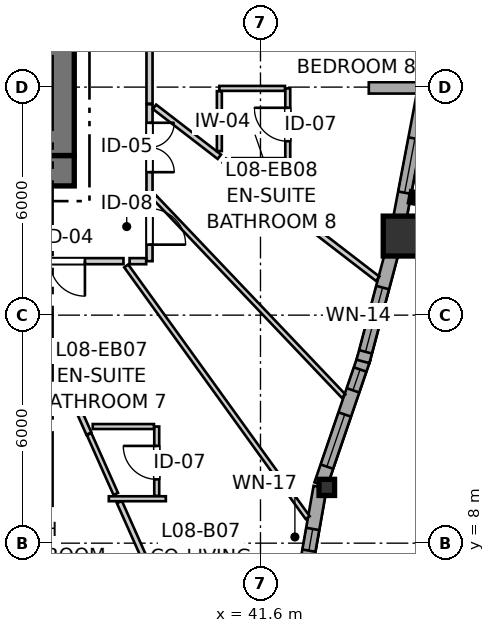
"""IFC4 building model, lengths in metres.
Left out: names, types, materials, properties, quantities, classifications, styles, units other than length and angle.
Written with IfcOpenShell. Run it as: python <this file> out.ifc"""

import sys

from ifc_helpers import new_model, si_unit, direction, frame, frame_2d, origin, origin_2d, place, context, subcontext, project, spatial, rectangle, i_section, extrude, source, transform, mapped, element, fill, save


model = new_model("IFC4")
c1 = context("Model", 3, precision=1e-05, world=origin(), true_north=direction((0.0, 1.0)))
c2 = subcontext(c1, "Body", "Model", "MODEL_VIEW")
j1 = project(units=[si_unit("LENGTHUNIT", "METRE"), si_unit("PLANEANGLEUNIT", "RADIAN")], contexts=[c1])
p1 = place(None, origin())
s1 = spatial("IfcSite", under=j1, at=p1, CompositionType="ELEMENT")
p2 = place(p1, origin())
s2 = spatial("IfcBuilding", under=s1, at=p2, CompositionType="ELEMENT")
p3 = place(p2, frame((0.0, 0.0, 30.2)))
s3 = spatial("IfcBuildingStorey", under=s2, at=p3, CompositionType="ELEMENT", Elevation=30.2)
p4 = place(p3, frame((24.0, 17.8, 0.0), z_axis=(0.0, 0.0, 1.0), x_axis=(1.0, 0.0, 0.0)))
e1 = element("IfcWall", 1, at=p4, inside=s3, PredefinedType="SHEAR", context=c2, shape_type="SweptSolid", body=[
    extrude(rectangle(XDim=12.7, YDim=0.8, at=frame_2d((6.35, 0.0))), origin(), (0.0, 0.0, 1.0), 2.935),
])
p5 = place(p3, frame((36.3, 18.2, 0.0), z_axis=(0.0, 0.0, 1.0), x_axis=(0.0, 1.0, 0.0)))
e2 = element("IfcWall", 2, at=p5, inside=s3, PredefinedType="SHEAR", context=c2, shape_type="SweptSolid", body=[
    extrude(rectangle(XDim=15.6, YDim=0.8, at=frame_2d((7.8, 0.0))), origin(), (0.0, 0.0, 1.0), 2.935),
])
p6 = place(p5, frame((4.25, 0.0, 0.0)))
e3 = element("IfcOpeningElement", 3, at=p6, cuts=e2, PredefinedType="OPENING", context=c2, shape_type="SweptSolid", body=[
    extrude(rectangle(XDim=1.1, YDim=2.15, at=frame_2d((0.55, 1.075))), frame((0.0, 0.41, 0.0), z_axis=(0.0, -1.0, 0.0), x_axis=(1.0, 0.0, 0.0)), (0.0, 0.0, 1.0), 0.82),
])
p7 = place(p5, frame((10.25, 0.0, 0.0)))
e4 = element("IfcOpeningElement", 4, at=p7, cuts=e2, PredefinedType="OPENING", context=c2, shape_type="SweptSolid", body=[
    extrude(rectangle(XDim=1.1, YDim=2.15, at=frame_2d((0.55, 1.075))), frame((0.0, 0.41, 0.0), z_axis=(0.0, -1.0, 0.0), x_axis=(1.0, 0.0, 0.0)), (0.0, 0.0, 1.0), 0.82),
])
m1 = source(origin(), c2, "Body", "SweptSolid", [
    extrude(i_section(OverallWidth=0.409, OverallDepth=0.425, WebThickness=0.03, FlangeThickness=0.048, FilletRadius=0.015, at=origin_2d()), origin(), (0.0, 0.0, 1.0), 2.935),
])
p8 = place(p3, frame((43.345, 9.468, 0.0), z_axis=(0.0, 0.0, 1.0), x_axis=(1.0, 0.0, 0.0)))
e5 = element("IfcColumn", 5, at=p8, inside=s3, PredefinedType="PILASTER", context=c2, shape_type="MappedRepresentation", body=[
    mapped(m1, transform((0.0, 0.0, 0.0), x_axis=(1.0, 0.0, 0.0), y_axis=(0.0, 1.0, 0.0), z_axis=(0.0, 0.0, 1.0), scale=1.0)),
])
m2 = source(origin(), c2, "Body", "SweptSolid", [
    extrude(rectangle(XDim=1.05, YDim=1.05, at=origin_2d()), origin(), (0.0, 0.0, 1.0), 2.935),
])
p9 = place(p3, frame((45.355, 16.081, 0.0), z_axis=(0.0, 0.0, 1.0), x_axis=(1.0, 0.0, 0.0)))
e6 = element("IfcColumn", 6, at=p9, inside=s3, PredefinedType="COLUMN", context=c2, shape_type="MappedRepresentation", body=[
    mapped(m2, transform((0.0, 0.0, 0.0), x_axis=(1.0, 0.0, 0.0), y_axis=(0.0, 1.0, 0.0), z_axis=(0.0, 0.0, 1.0), scale=1.0)),
])
p10 = place(p3, frame((42.816, 7.477, 0.0), z_axis=(0.0, 0.0, 1.0), x_axis=(0.173586593252, 0.984818610021, 0.0)))
e7 = element("IfcWall", 7, at=p10, inside=s3, PredefinedType="SOLIDWALL", context=c2, shape_type="SweptSolid", body=[
    extrude(rectangle(XDim=2.032, YDim=0.35, at=frame_2d((1.016, 0.0))), origin(), (0.0, 0.0, 1.0), 2.415),
])
p11 = place(p10, frame((0.332, 0.0, 0.82)))
e8 = element("IfcOpeningElement", 8, at=p11, cuts=e7, PredefinedType="OPENING", context=c2, shape_type="SweptSolid", body=[
    extrude(rectangle(XDim=0.58, YDim=1.35, at=frame_2d((0.29, 0.675))), frame((0.0, 0.185, 0.0), z_axis=(0.0, -1.0, 0.0), x_axis=(1.0, 0.0, 0.0)), (0.0, 0.0, 1.0), 0.37),
])
p12 = place(p3, frame((43.186, 9.543, 0.0), z_axis=(0.0, 0.0, 1.0), x_axis=(0.323620542135, 0.946186950189, 0.0)))
e9 = element("IfcWall", 9, at=p12, inside=s3, PredefinedType="SOLIDWALL", context=c2, shape_type="SweptSolid", body=[
    extrude(rectangle(XDim=3.512, YDim=0.35, at=frame_2d((1.756, 0.0))), origin(), (0.0, 0.0, 1.0), 2.415),
])
p13 = place(p12, frame((0.498, 0.0, 0.82)))
e10 = element("IfcOpeningElement", 10, at=p13, cuts=e9, PredefinedType="OPENING", context=c2, shape_type="SweptSolid", body=[
    extrude(rectangle(XDim=1.45, YDim=1.25, at=frame_2d((0.725, 0.625))), frame((0.0, 0.185, 0.0), z_axis=(0.0, -1.0, 0.0), x_axis=(1.0, 0.0, 0.0)), (0.0, 0.0, 1.0), 0.37),
])
p14 = place(p12, frame((2.619, 0.0, 0.82)))
e11 = element("IfcOpeningElement", 11, at=p14, cuts=e9, PredefinedType="OPENING", context=c2, shape_type="SweptSolid", body=[
    extrude(rectangle(XDim=0.58, YDim=1.35, at=frame_2d((0.29, 0.675))), frame((0.0, 0.185, 0.0), z_axis=(0.0, -1.0, 0.0), x_axis=(1.0, 0.0, 0.0)), (0.0, 0.0, 1.0), 0.37),
])
p15 = place(p3, frame((44.297, 12.782, 0.0), z_axis=(0.0, 0.0, 1.0), x_axis=(0.257090265476, 0.96638739406, 0.0)))
e12 = element("IfcWall", 12, at=p15, inside=s3, PredefinedType="SOLIDWALL", context=c2, shape_type="SweptSolid", body=[
    extrude(rectangle(XDim=3.159, YDim=0.35, at=frame_2d((1.58, 0.0))), origin(), (0.0, 0.0, 1.0), 2.415),
])
p16 = place(p15, frame((0.261, 0.0, 0.82)))
e13 = element("IfcOpeningElement", 13, at=p16, cuts=e12, PredefinedType="OPENING", context=c2, shape_type="SweptSolid", body=[
    extrude(rectangle(XDim=1.75, YDim=1.3, at=frame_2d((0.875, 0.65))), frame((0.0, 0.185, 0.0), z_axis=(0.0, -1.0, 0.0), x_axis=(1.0, 0.0, 0.0)), (0.0, 0.0, 1.0), 0.37),
])
p17 = place(p3, frame((45.24, 16.408, 0.0), z_axis=(0.0, 0.0, 1.0), x_axis=(0.186636709983, 0.982428999209, 0.0)))
e14 = element("IfcWall", 14, at=p17, inside=s3, PredefinedType="SOLIDWALL", context=c2, shape_type="SweptSolid", body=[
    extrude(rectangle(XDim=3.446, YDim=0.35, at=frame_2d((1.723, 0.0))), origin(), (0.0, 0.0, 1.0), 2.415),
])
p18 = place(p17, frame((0.828, 0.0, 0.82)))
e15 = element("IfcOpeningElement", 15, at=p18, cuts=e14, PredefinedType="OPENING", context=c2, shape_type="SweptSolid", body=[
    extrude(rectangle(XDim=1.45, YDim=1.25, at=frame_2d((0.725, 0.625))), frame((0.0, 0.185, 0.0), z_axis=(0.0, -1.0, 0.0), x_axis=(1.0, 0.0, 0.0)), (0.0, 0.0, 1.0), 0.37),
])
p19 = place(p3, frame((44.45, 19.98, 0.0), z_axis=(0.0, 0.0, 1.0), x_axis=(1.0, 0.0, 0.0)))
e16 = element("IfcWall", 16, at=p19, inside=s3, PredefinedType="SOLIDWALL", context=c2, shape_type="SweptSolid", body=[
    extrude(rectangle(XDim=20.685, YDim=0.3, at=frame_2d((10.342, 0.0))), origin(), (0.0, 0.0, 1.0), 2.115),
])
p20 = place(p3, frame((38.68, 23.699, 0.0), z_axis=(0.0, 0.0, 1.0), x_axis=(0.0, -1.0, 0.0)))
e17 = element("IfcWall", 17, at=p20, inside=s3, PredefinedType="PARTITIONING", context=c2, shape_type="SweptSolid", body=[
    extrude(rectangle(XDim=4.135, YDim=0.16, at=frame_2d((2.067, 0.0))), origin(), (0.0, 0.0, 1.0), 2.935),
])
p21 = place(p20, frame((1.583, 0.0, 0.0)))
e18 = element("IfcOpeningElement", 18, at=p21, cuts=e17, PredefinedType="OPENING", context=c2, shape_type="SweptSolid", body=[
    extrude(rectangle(XDim=0.92, YDim=2.1, at=frame_2d((0.46, 1.05))), frame((0.0, 0.09, 0.0), z_axis=(0.0, -1.0, 0.0), x_axis=(1.0, 0.0, 0.0)), (0.0, 0.0, 1.0), 0.18),
])
p22 = place(p3, frame((37.995, 15.42, 0.0), z_axis=(0.0, 0.0, 1.0), x_axis=(-1.0, 0.0, 0.0)))
e19 = element("IfcWall", 19, at=p22, inside=s3, PredefinedType="PARTITIONING", context=c2, shape_type="SweptSolid", body=[
    extrude(rectangle(XDim=2.9, YDim=0.16, at=frame_2d((1.45, 0.0))), origin(), (0.0, 0.0, 1.0), 2.935),
])
p23 = place(p22, frame((1.014, 0.0, 0.0)))
e20 = element("IfcOpeningElement", 20, at=p23, cuts=e19, PredefinedType="OPENING", context=c2, shape_type="SweptSolid", body=[
    extrude(rectangle(XDim=0.92, YDim=2.1, at=frame_2d((0.46, 1.05))), frame((0.0, 0.09, 0.0), z_axis=(0.0, -1.0, 0.0), x_axis=(1.0, 0.0, 0.0)), (0.0, 0.0, 1.0), 0.18),
])
p24 = place(p3, frame((38.68, 19.549, 0.0), z_axis=(0.0, 0.0, 1.0), x_axis=(0.0, -1.0, 0.0)))
e21 = element("IfcWall", 21, at=p24, inside=s3, PredefinedType="PARTITIONING", context=c2, shape_type="SweptSolid", body=[
    extrude(rectangle(XDim=2.331, YDim=0.16, at=frame_2d((1.166, 0.0))), origin(), (0.0, 0.0, 1.0), 2.935),
])
p25 = place(p24, frame((0.488, 0.0, 0.0)))
e22 = element("IfcOpeningElement", 22, at=p25, cuts=e21, PredefinedType="OPENING", context=c2, shape_type="SweptSolid", body=[
    extrude(rectangle(XDim=1.3, YDim=2.1, at=frame_2d((0.65, 1.05))), frame((0.0, 0.09, 0.0), z_axis=(0.0, -1.0, 0.0), x_axis=(1.0, 0.0, 0.0)), (0.0, 0.0, 1.0), 0.18),
])
p26 = place(p3, frame((42.318, 18.066, 0.0), z_axis=(0.0, 0.0, 1.0), x_axis=(0.0, 1.0, 0.0)))
e23 = element("IfcWall", 23, at=p26, inside=s3, PredefinedType="PARTITIONING", context=c2, shape_type="SweptSolid", body=[
    extrude(rectangle(XDim=1.9, YDim=0.13, at=frame_2d((0.95, 0.0))), origin(), (0.0, 0.0, 1.0), 2.935),
])
p27 = place(p26, frame((0.51, 0.0, 0.0)))
e24 = element("IfcOpeningElement", 24, at=p27, cuts=e23, PredefinedType="OPENING", context=c2, shape_type="SweptSolid", body=[
    extrude(rectangle(XDim=0.88, YDim=2.05, at=frame_2d((0.44, 1.025))), frame((0.0, 0.075, 0.0), z_axis=(0.0, -1.0, 0.0), x_axis=(1.0, 0.0, 0.0)), (0.0, 0.0, 1.0), 0.15),
])
p28 = place(p3, frame((38.87, 9.242, 0.0), z_axis=(0.0, 0.0, 1.0), x_axis=(0.0, 1.0, 0.0)))
e25 = element("IfcWall", 25, at=p28, inside=s3, PredefinedType="PARTITIONING", context=c2, shape_type="SweptSolid", body=[
    extrude(rectangle(XDim=1.827, YDim=0.13, at=frame_2d((0.914, 0.0))), origin(), (0.0, 0.0, 1.0), 2.935),
])
p29 = place(p28, frame((0.437, 0.0, 0.0)))
e26 = element("IfcOpeningElement", 26, at=p29, cuts=e25, PredefinedType="OPENING", context=c2, shape_type="SweptSolid", body=[
    extrude(rectangle(XDim=0.88, YDim=2.05, at=frame_2d((0.44, 1.025))), frame((0.0, 0.075, 0.0), z_axis=(0.0, -1.0, 0.0), x_axis=(1.0, 0.0, 0.0)), (0.0, 0.0, 1.0), 0.15),
])
p30 = place(p3, frame((38.68, 17.203, 0.0), z_axis=(0.0, 0.0, 1.0), x_axis=(0.0, -1.0, 0.0)))
e27 = element("IfcWall", 27, at=p30, inside=s3, PredefinedType="PARTITIONING", context=c2, shape_type="SweptSolid", body=[
    extrude(rectangle(XDim=1.783, YDim=0.16, at=frame_2d((0.892, 0.0))), origin(), (0.0, 0.0, 1.0), 2.935),
])
p31 = place(p30, frame((0.398, 0.0, 0.0)))
e28 = element("IfcOpeningElement", 28, at=p31, cuts=e27, PredefinedType="OPENING", context=c2, shape_type="SweptSolid", body=[
    extrude(rectangle(XDim=0.95, YDim=2.1, at=frame_2d((0.475, 1.05))), frame((0.0, 0.09, 0.0), z_axis=(0.0, -1.0, 0.0), x_axis=(1.0, 0.0, 0.0)), (0.0, 0.0, 1.0), 0.18),
])
p32 = place(p3, frame((38.067, 15.295, 0.0), z_axis=(0.0, 0.0, 1.0), x_axis=(0.584777320582, -0.811193864211, 0.0)))
e29 = element("IfcWall", 29, at=p32, inside=s3, PredefinedType="PARTITIONING", context=c2, shape_type="SweptSolid", body=[
    extrude(rectangle(XDim=8.164, YDim=0.13, at=frame_2d((4.082, 0.0))), origin(), (0.0, 0.0, 1.0), 2.935),
])
p33 = place(p3, frame((38.812, 17.101, 0.0), z_axis=(0.0, 0.0, 1.0), x_axis=(0.689140556814, -0.724627692649, 0.0)))
e30 = element("IfcWall", 30, at=p33, inside=s3, PredefinedType="PARTITIONING", context=c2, shape_type="SweptSolid", body=[
    extrude(rectangle(XDim=7.217, YDim=0.13, at=frame_2d((3.608, 0.0))), origin(), (0.0, 0.0, 1.0), 2.935),
])
p34 = place(p3, frame((40.649, 18.066, 0.0), z_axis=(0.0, 0.0, 1.0), x_axis=(0.792155051101, -0.610319895641, 0.0)))
e31 = element("IfcWall", 31, at=p34, inside=s3, PredefinedType="PARTITIONING", context=c2, shape_type="SweptSolid", body=[
    extrude(rectangle(XDim=5.093, YDim=0.145, at=frame_2d((2.546, 0.0))), origin(), (0.0, 0.0, 1.0), 2.935),
])
p35 = place(p3, frame((37.887, 9.082, 0.0), z_axis=(0.0, 0.0, 1.0), x_axis=(0.406941066305, -0.913454415149, 0.0)))
e32 = element("IfcWall", 32, at=p35, inside=s3, PredefinedType="PARTITIONING", context=c2, shape_type="SweptSolid", body=[
    extrude(rectangle(XDim=4.882, YDim=0.145, at=frame_2d((2.441, 0.0))), origin(), (0.0, 0.0, 1.0), 2.935),
])
p36 = place(p3, frame((35.116, 15.303, 0.0), z_axis=(0.0, 0.0, 1.0), x_axis=(0.406910733823, -0.913467927571, 0.0)))
e33 = element("IfcWall", 33, at=p36, inside=s3, PredefinedType="PARTITIONING", context=c2, shape_type="SweptSolid", body=[
    extrude(rectangle(XDim=4.839, YDim=0.145, at=frame_2d((2.419, 0.0))), origin(), (0.0, 0.0, 1.0), 2.935),
])
p37 = place(p3, frame((38.811, 19.482, 0.0), z_axis=(0.0, 0.0, 1.0), x_axis=(0.792185877025, -0.61027988353, 0.0)))
e34 = element("IfcWall", 34, at=p37, inside=s3, PredefinedType="PARTITIONING", context=c2, shape_type="SweptSolid", body=[
    extrude(rectangle(XDim=2.156, YDim=0.145, at=frame_2d((1.078, 0.0))), origin(), (0.0, 0.0, 1.0), 2.935),
])
p38 = place(p3, frame((37.091, 10.869, 0.0), z_axis=(0.0, 0.0, 1.0), x_axis=(0.406835672622, -0.913501360416, 0.0)))
e35 = element("IfcWall", 35, at=p38, inside=s3, PredefinedType="PARTITIONING", context=c2, shape_type="SweptSolid", body=[
    extrude(rectangle(XDim=1.722, YDim=0.13, at=frame_2d((0.861, 0.0))), origin(), (0.0, 0.0, 1.0), 2.935),
])
p39 = place(p3, frame((37.186, 11.069, 0.0), z_axis=(0.0, 0.0, 1.0), x_axis=(1.0, 0.0, 0.0)))
e36 = element("IfcWall", 36, at=p39, inside=s3, PredefinedType="PARTITIONING", context=c2, shape_type="SweptSolid", body=[
    extrude(rectangle(XDim=1.611, YDim=0.13, at=frame_2d((0.805, 0.0))), origin(), (0.0, 0.0, 1.0), 2.935),
])
p40 = place(p3, frame((40.518, 19.966, 0.0), z_axis=(0.0, 0.0, 1.0), x_axis=(1.0, 0.0, 0.0)))
e37 = element("IfcWall", 37, at=p40, inside=s3, PredefinedType="PARTITIONING", context=c2, shape_type="SweptSolid", body=[
    extrude(rectangle(XDim=1.727, YDim=0.13, at=frame_2d((0.864, 0.0))), origin(), (0.0, 0.0, 1.0), 2.103),
])
p41 = place(p3, frame((40.518, 18.317, 0.0), z_axis=(0.0, 0.0, 1.0), x_axis=(0.0, 1.0, 0.0)))
e38 = element("IfcWall", 38, at=p41, inside=s3, PredefinedType="PARTITIONING", context=c2, shape_type="SweptSolid", body=[
    extrude(rectangle(XDim=1.576, YDim=0.13, at=frame_2d((0.788, 0.0))), origin(), (0.0, 0.0, 1.0), 2.935),
])
p42 = place(p3, frame((40.86, 18.066, 0.0), z_axis=(0.0, 0.0, 1.0), x_axis=(1.0, 0.0, 0.0)))
e39 = element("IfcWall", 39, at=p42, inside=s3, PredefinedType="PARTITIONING", context=c2, shape_type="SweptSolid", body=[
    extrude(rectangle(XDim=1.385, YDim=0.13, at=frame_2d((0.692, 0.0))), origin(), (0.0, 0.0, 1.0), 2.935),
])
p43 = place(p3, frame((37.609, 9.169, 0.0), z_axis=(0.0, 0.0, 1.0), x_axis=(1.0, 0.0, 0.0)))
e40 = element("IfcWall", 40, at=p43, inside=s3, PredefinedType="PARTITIONING", context=c2, shape_type="SweptSolid", body=[
    extrude(rectangle(XDim=1.501, YDim=0.13, at=frame_2d((0.75, 0.0))), origin(), (0.0, 0.0, 1.0), 2.935),
])
p44 = place(p3, frame((38.156, 15.42, 0.0), z_axis=(0.0, 0.0, 1.0), x_axis=(1.0, 0.0, 0.0)))
e41 = element("IfcWall", 41, at=p44, inside=s3, PredefinedType="PARTITIONING", context=c2, shape_type="SweptSolid", body=[
    extrude(rectangle(XDim=0.436, YDim=0.16, at=frame_2d((0.218, 0.0))), origin(), (0.0, 0.0, 1.0), 2.935),
])
m3 = source(origin(), c2, "Body", "SweptSolid", [
    extrude(rectangle(XDim=0.58, YDim=1.35, at=frame_2d((0.29, 0.675))), frame((0.0, 0.03, 0.0), z_axis=(0.0, -1.0, 0.0), x_axis=(1.0, 0.0, 0.0)), (0.0, 0.0, 1.0), 0.06),
])
p45 = place(p11, origin())
e42 = element("IfcWindow", 42, at=p45, inside=s3, PartitioningType="SINGLE_PANEL", PredefinedType="WINDOW", context=c2, shape_type="MappedRepresentation", body=[
    mapped(m3, transform((0.0, 0.0, 0.0), x_axis=(1.0, 0.0, 0.0), y_axis=(0.0, 1.0, 0.0), z_axis=(0.0, 0.0, 1.0), scale=1.0)),
])
fill(e8, e42)
m4 = source(origin(), c2, "Body", "SweptSolid", [
    extrude(rectangle(XDim=1.45, YDim=1.25, at=frame_2d((0.725, 0.625))), frame((0.0, 0.03, 0.0), z_axis=(0.0, -1.0, 0.0), x_axis=(1.0, 0.0, 0.0)), (0.0, 0.0, 1.0), 0.06),
])
p46 = place(p13, origin())
e43 = element("IfcWindow", 43, at=p46, inside=s3, PartitioningType="SINGLE_PANEL", PredefinedType="WINDOW", context=c2, shape_type="MappedRepresentation", body=[
    mapped(m4, transform((0.0, 0.0, 0.0), x_axis=(1.0, 0.0, 0.0), y_axis=(0.0, 1.0, 0.0), z_axis=(0.0, 0.0, 1.0), scale=1.0)),
])
fill(e10, e43)
p47 = place(p14, origin())
e44 = element("IfcWindow", 44, at=p47, inside=s3, PartitioningType="SINGLE_PANEL", PredefinedType="WINDOW", context=c2, shape_type="MappedRepresentation", body=[
    mapped(m3, transform((0.0, 0.0, 0.0), x_axis=(1.0, 0.0, 0.0), y_axis=(0.0, 1.0, 0.0), z_axis=(0.0, 0.0, 1.0), scale=1.0)),
])
fill(e11, e44)
m5 = source(origin(), c2, "Body", "SweptSolid", [
    extrude(rectangle(XDim=1.75, YDim=1.3, at=frame_2d((0.875, 0.65))), frame((0.0, 0.03, 0.0), z_axis=(0.0, -1.0, 0.0), x_axis=(1.0, 0.0, 0.0)), (0.0, 0.0, 1.0), 0.06),
])
p48 = place(p16, origin())
e45 = element("IfcWindow", 45, at=p48, inside=s3, PartitioningType="SINGLE_PANEL", PredefinedType="WINDOW", context=c2, shape_type="MappedRepresentation", body=[
    mapped(m5, transform((0.0, 0.0, 0.0), x_axis=(1.0, 0.0, 0.0), y_axis=(0.0, 1.0, 0.0), z_axis=(0.0, 0.0, 1.0), scale=1.0)),
])
fill(e13, e45)
p49 = place(p18, origin())
e46 = element("IfcWindow", 46, at=p49, inside=s3, PartitioningType="SINGLE_PANEL", PredefinedType="WINDOW", context=c2, shape_type="MappedRepresentation", body=[
    mapped(m4, transform((0.0, 0.0, 0.0), x_axis=(1.0, 0.0, 0.0), y_axis=(0.0, 1.0, 0.0), z_axis=(0.0, 0.0, 1.0), scale=1.0)),
])
fill(e15, e46)
m6 = source(origin(), c2, "Body", "SweptSolid", [
    extrude(rectangle(XDim=0.92, YDim=2.1, at=frame_2d((0.46, 1.05))), frame((0.0, 0.025, 0.0), z_axis=(0.0, -1.0, 0.0), x_axis=(1.0, 0.0, 0.0)), (0.0, 0.0, 1.0), 0.05),
])
p50 = place(p23, origin())
e47 = element("IfcDoor", 47, at=p50, inside=s3, OperationType="SINGLE_SWING_LEFT", PredefinedType="DOOR", context=c2, shape_type="MappedRepresentation", body=[
    mapped(m6, transform((0.0, 0.0, 0.0), x_axis=(1.0, 0.0, 0.0), y_axis=(0.0, 1.0, 0.0), z_axis=(0.0, 0.0, 1.0), scale=1.0)),
])
fill(e20, e47)
m7 = source(origin(), c2, "Body", "SweptSolid", [
    extrude(rectangle(XDim=1.3, YDim=2.1, at=frame_2d((0.65, 1.05))), frame((0.0, 0.025, 0.0), z_axis=(0.0, -1.0, 0.0), x_axis=(1.0, 0.0, 0.0)), (0.0, 0.0, 1.0), 0.05),
])
p51 = place(p25, origin())
e48 = element("IfcDoor", 48, at=p51, inside=s3, OperationType="DOUBLE_DOOR_SINGLE_SWING", PredefinedType="DOOR", context=c2, shape_type="MappedRepresentation", body=[
    mapped(m7, transform((0.0, 0.0, 0.0), x_axis=(1.0, 0.0, 0.0), y_axis=(0.0, 1.0, 0.0), z_axis=(0.0, 0.0, 1.0), scale=1.0)),
])
fill(e22, e48)
m8 = source(origin(), c2, "Body", "SweptSolid", [
    extrude(rectangle(XDim=0.88, YDim=2.05, at=frame_2d((0.44, 1.025))), frame((0.0, 0.025, 0.0), z_axis=(0.0, -1.0, 0.0), x_axis=(1.0, 0.0, 0.0)), (0.0, 0.0, 1.0), 0.05),
])
p52 = place(p27, origin())
e49 = element("IfcDoor", 49, at=p52, inside=s3, OperationType="SINGLE_SWING_RIGHT", PredefinedType="DOOR", context=c2, shape_type="MappedRepresentation", body=[
    mapped(m8, transform((0.0, 0.0, 0.0), x_axis=(1.0, 0.0, 0.0), y_axis=(0.0, 1.0, 0.0), z_axis=(0.0, 0.0, 1.0), scale=1.0)),
])
fill(e24, e49)
p53 = place(p29, origin())
e50 = element("IfcDoor", 50, at=p53, inside=s3, OperationType="SINGLE_SWING_RIGHT", PredefinedType="DOOR", context=c2, shape_type="MappedRepresentation", body=[
    mapped(m8, transform((0.0, 0.0, 0.0), x_axis=(1.0, 0.0, 0.0), y_axis=(0.0, 1.0, 0.0), z_axis=(0.0, 0.0, 1.0), scale=1.0)),
])
fill(e26, e50)
m9 = source(origin(), c2, "Body", "SweptSolid", [
    extrude(rectangle(XDim=0.95, YDim=2.1, at=frame_2d((0.475, 1.05))), frame((0.0, 0.025, 0.0), z_axis=(0.0, -1.0, 0.0), x_axis=(1.0, 0.0, 0.0)), (0.0, 0.0, 1.0), 0.05),
])
p54 = place(p31, origin())
e51 = element("IfcDoor", 51, at=p54, inside=s3, OperationType="SINGLE_SWING_RIGHT", PredefinedType="DOOR", context=c2, shape_type="MappedRepresentation", body=[
    mapped(m9, transform((0.0, 0.0, 0.0), x_axis=(1.0, 0.0, 0.0), y_axis=(0.0, 1.0, 0.0), z_axis=(0.0, 0.0, 1.0), scale=1.0)),
])
fill(e28, e51)
save(model, sys.argv[1])
